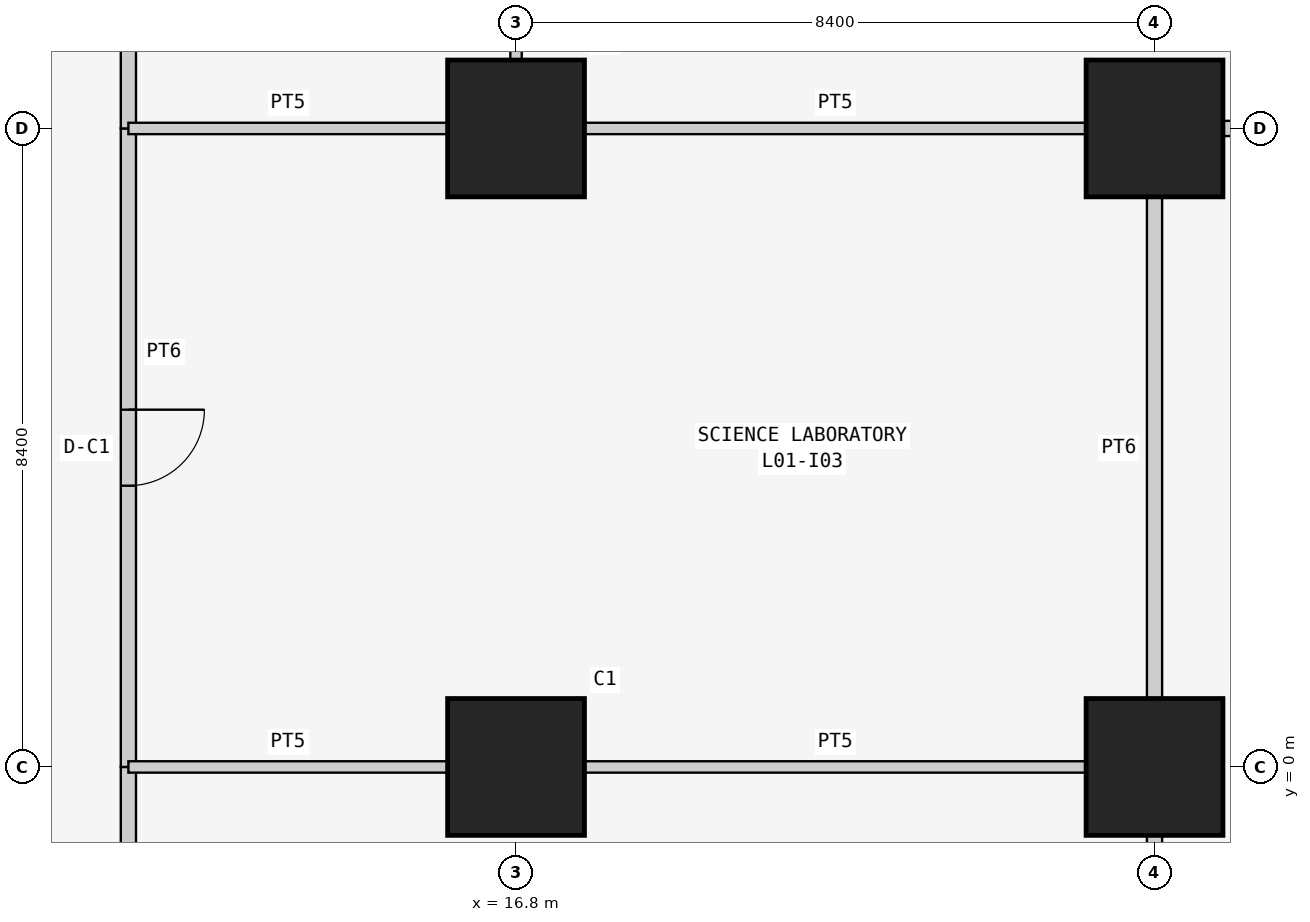
"""IFC4 building model, lengths in metres.
Left out: names, types, materials, properties, quantities, classifications, styles, units other than length and angle.
Written with IfcOpenShell. Run it as: python <this file> out.ifc"""

import sys

from ifc_helpers import new_model, si_unit, direction, frame, frame_2d, origin, origin_2d, place, context, subcontext, project, spatial, rectangle, extrude, element, fill, save


model = new_model("IFC4")
c1 = context("Model", 3, precision=1e-05, world=origin(), true_north=direction((0.0, 1.0)))
c2 = subcontext(c1, "Body", "Model", "MODEL_VIEW")
j1 = project(units=[si_unit("LENGTHUNIT", "METRE"), si_unit("PLANEANGLEUNIT", "RADIAN")], contexts=[c1])
p1 = place(None, origin())
s1 = spatial("IfcSite", under=j1, at=p1, CompositionType="ELEMENT")
p2 = place(p1, origin())
s2 = spatial("IfcBuilding", under=s1, at=p2, CompositionType="ELEMENT")
p3 = place(p2, frame((0.0, 0.0, 6.0)))
s3 = spatial("IfcBuildingStorey", under=s2, at=p3, CompositionType="ELEMENT", Elevation=6.0)
for number, where, z_axis, x_axis in (
    (1, (16.8, 0.0, 0.0), (0.0, 0.0, 1.0), (1.0, 0.0, 0.0)),
    (2, (16.8, 8.4, 0.0), (0.0, 0.0, 1.0), (1.0, 0.0, 0.0)),
    (3, (25.2, 0.0, 0.0), (0.0, 0.0, 1.0), (1.0, 0.0, 0.0)),
    (4, (25.2, 8.4, 0.0), (0.0, 0.0, 1.0), (1.0, 0.0, 0.0)),
):
    element("IfcColumn", number, at=place(p3, frame(where, z_axis=z_axis, x_axis=x_axis)), inside=s3, PredefinedType="COLUMN", context=c2, shape_type="SweptSolid", body=[
        extrude(rectangle(XDim=1.8, YDim=1.8, at=origin_2d()), origin(), (0.0, 0.0, 1.0), 4.5),
    ])
p4 = place(p3, frame((11.7, 0.0, 0.0), z_axis=(0.0, 0.0, 1.0), x_axis=(0.0, -1.0, 0.0)))
e5 = element("IfcWall", 5, at=p4, inside=s3, PredefinedType="PARTITIONING", context=c2, shape_type="SweptSolid", body=[
    extrude(rectangle(XDim=5.1, YDim=0.2, at=frame_2d((2.55, 0.0))), origin(), (0.0, 0.0, 1.0), 4.3),
])
p5 = place(p3, frame((25.2, -5.1, 0.0), z_axis=(0.0, 0.0, 1.0), x_axis=(0.0, 1.0, 0.0)))
e6 = element("IfcWall", 6, at=p5, inside=s3, PredefinedType="PARTITIONING", context=c2, shape_type="SweptSolid", body=[
    extrude(rectangle(XDim=4.2, YDim=0.2, at=frame_2d((2.1, 0.0))), origin(), (0.0, 0.0, 1.0), 3.543),
])
p6 = place(p3, frame((11.7, 8.4, 0.0), z_axis=(0.0, 0.0, 1.0), x_axis=(0.0, -1.0, 0.0)))
e7 = element("IfcWall", 7, at=p6, inside=s3, PredefinedType="PARTITIONING", context=c2, shape_type="SweptSolid", body=[
    extrude(rectangle(XDim=8.4, YDim=0.2, at=frame_2d((4.2, 0.0))), origin(), (0.0, 0.0, 1.0), 4.3),
])
p7 = place(p6, frame((3.7, 0.0, 0.0)))
e8 = element("IfcOpeningElement", 8, at=p7, cuts=e7, PredefinedType="OPENING", context=c2, shape_type="SweptSolid", body=[
    extrude(rectangle(XDim=1.0, YDim=2.1, at=frame_2d((0.5, 1.05))), frame((0.0, 0.11, 0.0), z_axis=(0.0, -1.0, 0.0), x_axis=(1.0, 0.0, 0.0)), (0.0, 0.0, 1.0), 0.22),
])
p8 = place(p3, frame((25.2, 0.9, 0.0), z_axis=(0.0, 0.0, 1.0), x_axis=(0.0, 1.0, 0.0)))
e9 = element("IfcWall", 9, at=p8, inside=s3, PredefinedType="PARTITIONING", context=c2, shape_type="SweptSolid", body=[
    extrude(rectangle(XDim=6.6, YDim=0.2, at=frame_2d((3.3, 0.0))), origin(), (0.0, 0.0, 1.0), 3.543),
])
p9 = place(p3, frame((11.7, 16.8, 0.0), z_axis=(0.0, 0.0, 1.0), x_axis=(0.0, -1.0, 0.0)))
e10 = element("IfcWall", 10, at=p9, inside=s3, PredefinedType="PARTITIONING", context=c2, shape_type="SweptSolid", body=[
    extrude(rectangle(XDim=8.4, YDim=0.2, at=frame_2d((4.2, 0.0))), origin(), (0.0, 0.0, 1.0), 4.3),
])
p10 = place(p9, frame((3.7, 0.0, 0.0)))
e11 = element("IfcOpeningElement", 11, at=p10, cuts=e10, PredefinedType="OPENING", context=c2, shape_type="SweptSolid", body=[
    extrude(rectangle(XDim=1.0, YDim=2.1, at=frame_2d((0.5, 1.05))), frame((0.0, 0.11, 0.0), z_axis=(0.0, -1.0, 0.0), x_axis=(1.0, 0.0, 0.0)), (0.0, 0.0, 1.0), 0.22),
])
p11 = place(p3, frame((26.1, 8.4, 0.0), z_axis=(0.0, 0.0, 1.0), x_axis=(1.0, 0.0, 0.0)))
e12 = element("IfcWall", 12, at=p11, inside=s3, PredefinedType="PARTITIONING", context=c2, shape_type="SweptSolid", body=[
    extrude(rectangle(XDim=6.6, YDim=0.2, at=frame_2d((3.3, 0.0))), origin(), (0.0, 0.0, 1.0), 3.543),
])
p12 = place(p11, frame((2.4, 0.0, 0.0)))
e13 = element("IfcOpeningElement", 13, at=p12, cuts=e12, PredefinedType="OPENING", context=c2, shape_type="SweptSolid", body=[
    extrude(rectangle(XDim=1.8, YDim=2.4, at=frame_2d((0.9, 1.2))), frame((0.0, 0.11, 0.0), z_axis=(0.0, -1.0, 0.0), x_axis=(1.0, 0.0, 0.0)), (0.0, 0.0, 1.0), 0.22),
])
p13 = place(p3, frame((11.7, 0.0, 0.0), z_axis=(0.0, 0.0, 1.0), x_axis=(1.0, 0.0, 0.0)))
e14 = element("IfcWall", 14, at=p13, inside=s3, PredefinedType="PARTITIONING", context=c2, shape_type="SweptSolid", body=[
    extrude(rectangle(XDim=4.2, YDim=0.15, at=frame_2d((2.1, 0.0))), origin(), (0.0, 0.0, 1.0), 3.543),
])
p14 = place(p3, frame((17.7, 0.0, 0.0), z_axis=(0.0, 0.0, 1.0), x_axis=(1.0, 0.0, 0.0)))
e15 = element("IfcWall", 15, at=p14, inside=s3, PredefinedType="PARTITIONING", context=c2, shape_type="SweptSolid", body=[
    extrude(rectangle(XDim=6.6, YDim=0.15, at=frame_2d((3.3, 0.0))), origin(), (0.0, 0.0, 1.0), 3.543),
])
p15 = place(p3, frame((11.7, 8.4, 0.0), z_axis=(0.0, 0.0, 1.0), x_axis=(1.0, 0.0, 0.0)))
e16 = element("IfcWall", 16, at=p15, inside=s3, PredefinedType="PARTITIONING", context=c2, shape_type="SweptSolid", body=[
    extrude(rectangle(XDim=4.2, YDim=0.15, at=frame_2d((2.1, 0.0))), origin(), (0.0, 0.0, 1.0), 3.543),
])
p16 = place(p3, frame((17.7, 8.4, 0.0), z_axis=(0.0, 0.0, 1.0), x_axis=(1.0, 0.0, 0.0)))
e17 = element("IfcWall", 17, at=p16, inside=s3, PredefinedType="PARTITIONING", context=c2, shape_type="SweptSolid", body=[
    extrude(rectangle(XDim=6.6, YDim=0.15, at=frame_2d((3.3, 0.0))), origin(), (0.0, 0.0, 1.0), 3.543),
])
p17 = place(p3, frame((16.8, 15.9, 0.0), z_axis=(0.0, 0.0, 1.0), x_axis=(0.0, -1.0, 0.0)))
e18 = element("IfcWall", 18, at=p17, inside=s3, PredefinedType="PARTITIONING", context=c2, shape_type="SweptSolid", body=[
    extrude(rectangle(XDim=6.6, YDim=0.15, at=frame_2d((3.3, 0.0))), origin(), (0.0, 0.0, 1.0), 3.543),
])
p18 = place(p7, origin())
e19 = element("IfcDoor", 19, at=p18, inside=s3, OperationType="SINGLE_SWING_LEFT", PredefinedType="DOOR", context=c2, shape_type="SweptSolid", body=[
    extrude(rectangle(XDim=1.0, YDim=2.1, at=frame_2d((0.5, 1.05))), frame((0.0, 0.025, 0.0), z_axis=(0.0, -1.0, 0.0), x_axis=(1.0, 0.0, 0.0)), (0.0, 0.0, 1.0), 0.05),
])
fill(e8, e19)
save(model, sys.argv[1])
